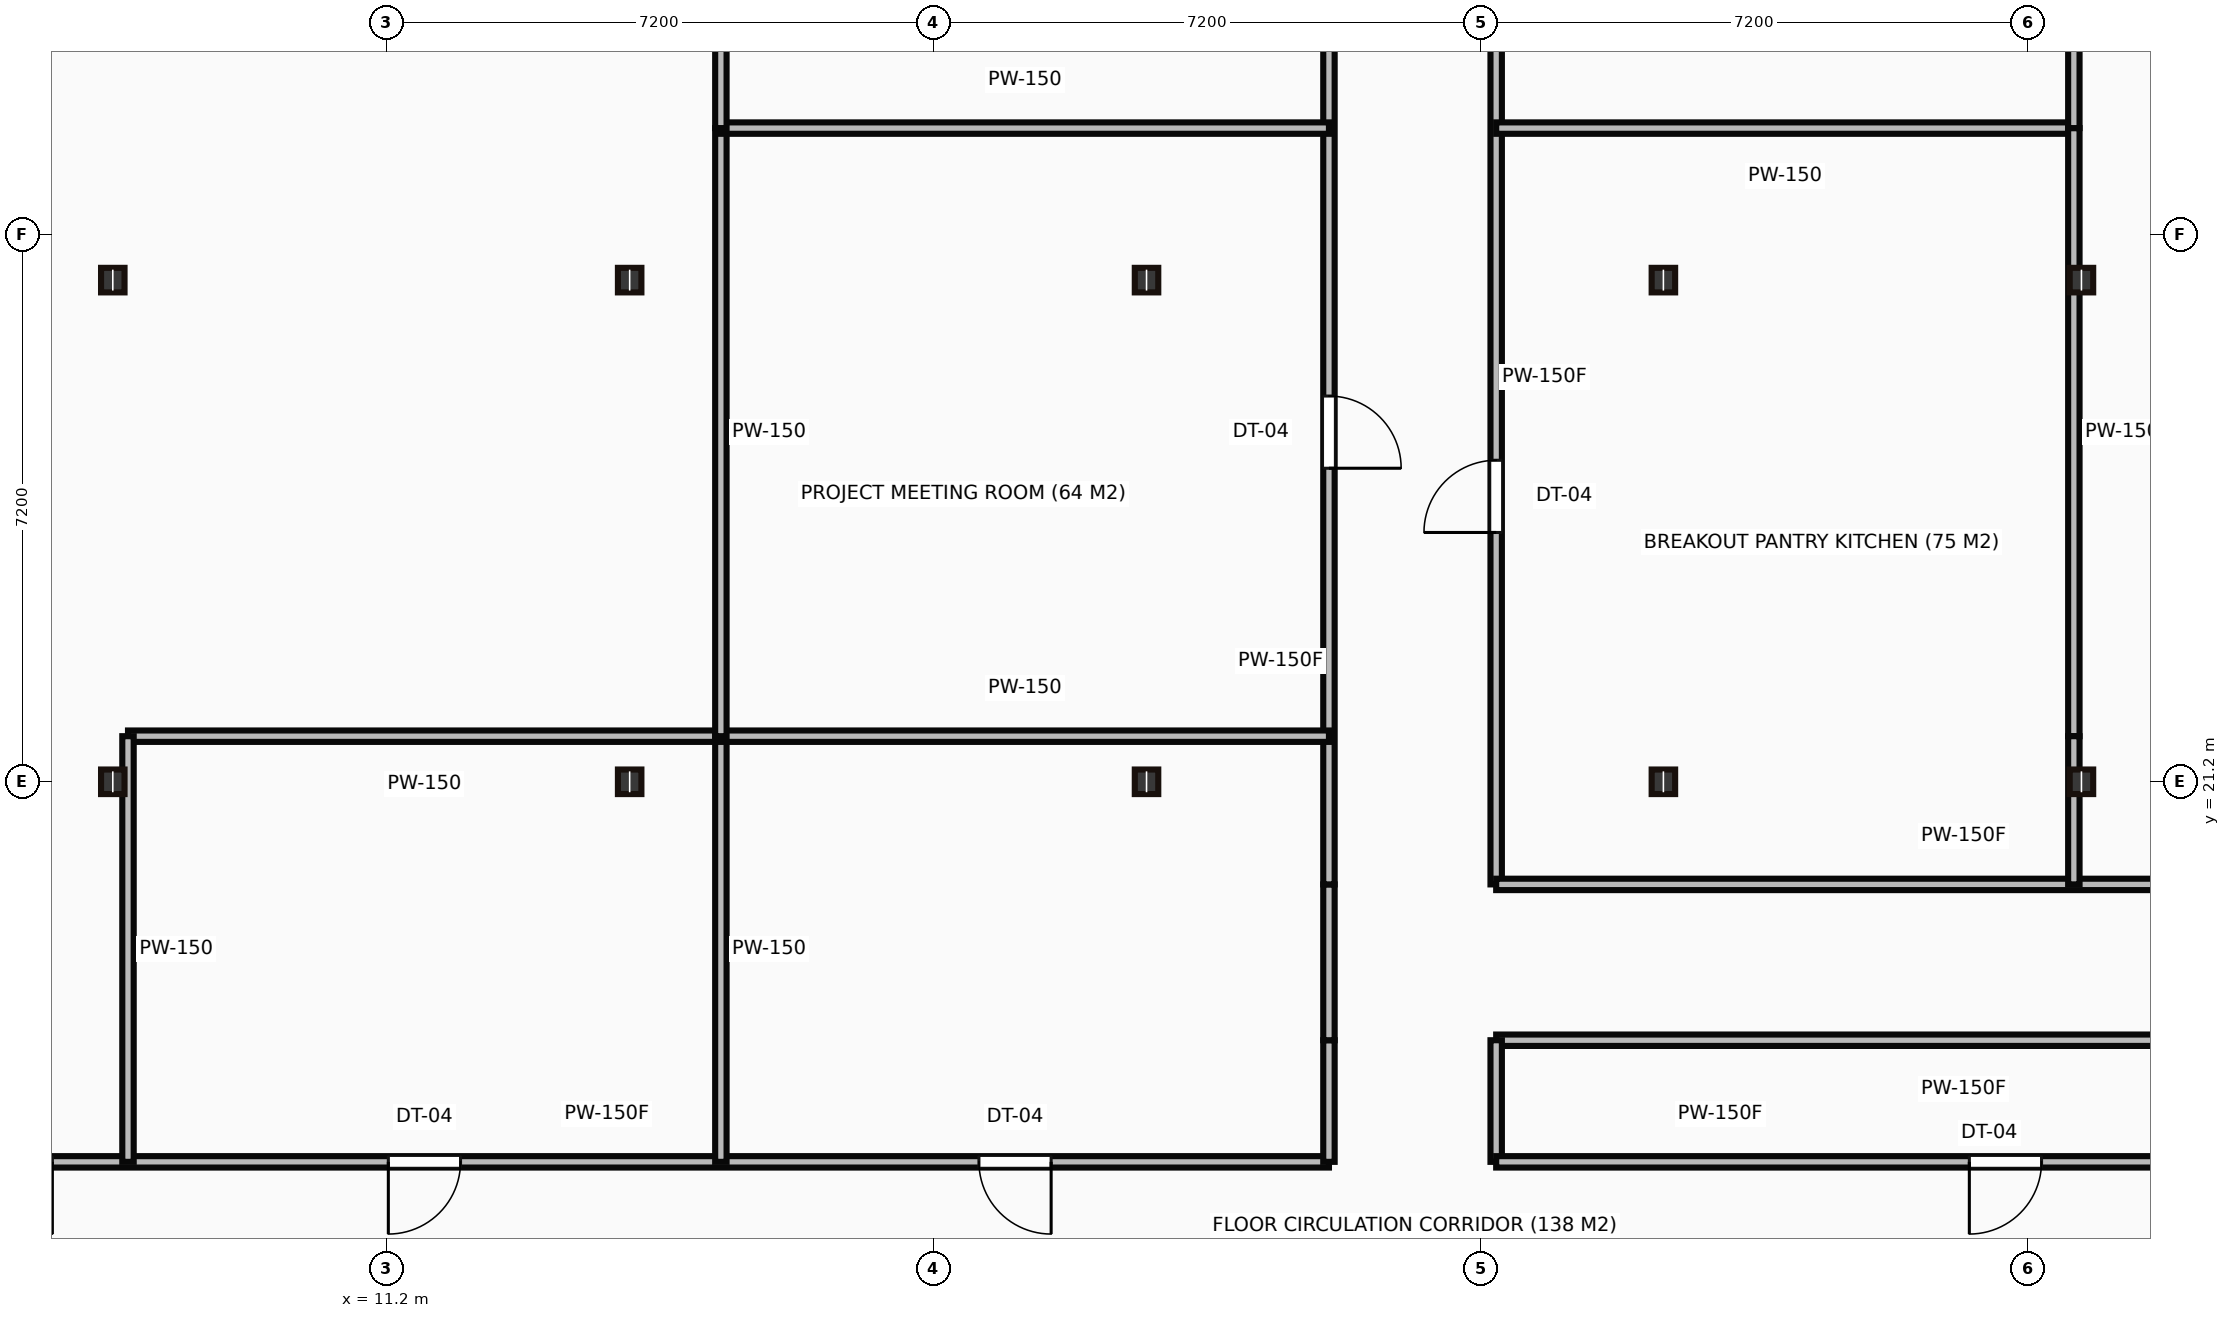
"""IFC4 building model, lengths in metres.
Left out: names, types, materials, properties, quantities, classifications, styles, units other than length and angle.
Written with IfcOpenShell. Run it as: python <this file> out.ifc"""

import sys

from ifc_helpers import new_model, si_unit, direction, frame, frame_2d, origin, origin_2d, place, context, subcontext, project, spatial, rectangle, i_section, extrude, source, transform, mapped, element, fill, save


model = new_model("IFC4")
c1 = context("Model", 3, precision=1e-05, world=origin(), true_north=direction((0.0, 1.0)))
c2 = subcontext(c1, "Body", "Model", "MODEL_VIEW")
j1 = project(units=[si_unit("LENGTHUNIT", "METRE"), si_unit("PLANEANGLEUNIT", "RADIAN")], contexts=[c1])
p1 = place(None, origin())
s1 = spatial("IfcSite", under=j1, at=p1, CompositionType="ELEMENT")
p2 = place(p1, origin())
s2 = spatial("IfcBuilding", under=s1, at=p2, CompositionType="ELEMENT")
p3 = place(p2, frame((0.0, 0.0, 195.9)))
s3 = spatial("IfcBuildingStorey", under=s2, at=p3, CompositionType="ELEMENT", Elevation=195.9)
m1 = source(origin(), c2, "Body", "SweptSolid", [
    extrude(i_section(OverallWidth=0.309, OverallDepth=0.323, WebThickness=0.014, FlangeThickness=0.023, at=origin_2d()), origin(), (0.0, 0.0, 1.0), 3.65),
])
for number, where, z_axis, x_axis in (
    (1, (7.6, 21.2, 0.0), (0.0, 0.0, 1.0), (1.0, 0.0, 0.0)),
    (2, (7.6, 27.8, 0.0), (0.0, 0.0, 1.0), (1.0, 0.0, 0.0)),
    (3, (14.4, 21.2, 0.0), (0.0, 0.0, 1.0), (1.0, 0.0, 0.0)),
    (4, (14.4, 27.8, 0.0), (0.0, 0.0, 1.0), (1.0, 0.0, 0.0)),
    (5, (21.2, 21.2, 0.0), (0.0, 0.0, 1.0), (1.0, 0.0, 0.0)),
    (6, (21.2, 27.8, 0.0), (0.0, 0.0, 1.0), (1.0, 0.0, 0.0)),
    (7, (28.0, 21.2, 0.0), (0.0, 0.0, 1.0), (1.0, 0.0, 0.0)),
    (8, (28.0, 27.8, 0.0), (0.0, 0.0, 1.0), (1.0, 0.0, 0.0)),
    (9, (33.5, 21.2, 0.0), (0.0, 0.0, 1.0), (1.0, 0.0, 0.0)),
    (10, (33.5, 27.8, 0.0), (0.0, 0.0, 1.0), (1.0, 0.0, 0.0)),
):
    element("IfcColumn", number, at=place(p3, frame(where, z_axis=z_axis, x_axis=x_axis)), inside=s3, PredefinedType="COLUMN", context=c2, shape_type="MappedRepresentation", body=[
        mapped(m1, transform((0.0, 0.0, 0.0))),
    ])
m2 = source(origin(), c2, "Body", "SweptSolid", [
    extrude(rectangle(XDim=19.0, YDim=0.15, at=frame_2d((9.5, 0.0))), origin(), (0.0, 0.0, 1.0), 3.4),
])
p4 = place(p3, frame((4.6, 16.2, 0.0), z_axis=(0.0, 0.0, 1.0), x_axis=(1.0, 0.0, 0.0)))
e11 = element("IfcWall", 11, at=p4, inside=s3, PredefinedType="PARTITIONING", context=c2, shape_type="MappedRepresentation", body=[
    mapped(m2, transform((0.0, 0.0, 0.0))),
])
p5 = place(p4, frame((1.255, 0.0, 0.0)))
e12 = element("IfcOpeningElement", 12, at=p5, cuts=e11, PredefinedType="OPENING", context=c2, shape_type="SweptSolid", body=[
    extrude(rectangle(XDim=0.95, YDim=2.15, at=frame_2d((0.475, 1.075))), frame((0.0, 0.085, 0.0), z_axis=(0.0, -1.0, 0.0), x_axis=(1.0, 0.0, 0.0)), (0.0, 0.0, 1.0), 0.17),
])
p6 = place(p4, frame((6.625, 0.0, 0.0)))
e13 = element("IfcOpeningElement", 13, at=p6, cuts=e11, PredefinedType="OPENING", context=c2, shape_type="SweptSolid", body=[
    extrude(rectangle(XDim=0.95, YDim=2.15, at=frame_2d((0.475, 1.075))), frame((0.0, 0.085, 0.0), z_axis=(0.0, -1.0, 0.0), x_axis=(1.0, 0.0, 0.0)), (0.0, 0.0, 1.0), 0.17),
])
p7 = place(p4, frame((14.395, 0.0, 0.0)))
e14 = element("IfcOpeningElement", 14, at=p7, cuts=e11, PredefinedType="OPENING", context=c2, shape_type="SweptSolid", body=[
    extrude(rectangle(XDim=0.95, YDim=2.15, at=frame_2d((0.475, 1.075))), frame((0.0, 0.085, 0.0), z_axis=(0.0, -1.0, 0.0), x_axis=(1.0, 0.0, 0.0)), (0.0, 0.0, 1.0), 0.17),
])
m3 = source(origin(), c2, "Body", "SweptSolid", [
    extrude(rectangle(XDim=1.6, YDim=0.15, at=frame_2d((0.8, 0.0))), origin(), (0.0, 0.0, 1.0), 3.4),
])
p8 = place(p3, frame((23.6, 16.2, 0.0), z_axis=(0.0, 0.0, 1.0), x_axis=(0.0, 1.0, 0.0)))
e15 = element("IfcWall", 15, at=p8, inside=s3, PredefinedType="PARTITIONING", context=c2, shape_type="MappedRepresentation", body=[
    mapped(m3, transform((0.0, 0.0, 0.0))),
])
m4 = source(origin(), c2, "Body", "SweptSolid", [
    extrude(rectangle(XDim=2.05, YDim=0.15, at=frame_2d((1.025, 0.0))), origin(), (0.0, 0.0, 1.0), 3.4),
])
p9 = place(p3, frame((23.6, 17.8, 0.0), z_axis=(0.0, 0.0, 1.0), x_axis=(0.0, 1.0, 0.0)))
e16 = element("IfcWall", 16, at=p9, inside=s3, PredefinedType="PARTITIONING", context=c2, shape_type="MappedRepresentation", body=[
    mapped(m4, transform((0.0, 0.0, 0.0))),
])
m5 = source(origin(), c2, "Body", "SweptSolid", [
    extrude(rectangle(XDim=13.35, YDim=0.15, at=frame_2d((6.675, 0.0))), origin(), (0.0, 0.0, 1.0), 3.4),
])
p10 = place(p3, frame((23.6, 19.85, 0.0), z_axis=(0.0, 0.0, 1.0), x_axis=(0.0, 1.0, 0.0)))
e17 = element("IfcWall", 17, at=p10, inside=s3, PredefinedType="PARTITIONING", context=c2, shape_type="MappedRepresentation", body=[
    mapped(m5, transform((0.0, 0.0, 0.0))),
])
p11 = place(p10, frame((5.475, 0.0, 0.0)))
e18 = element("IfcOpeningElement", 18, at=p11, cuts=e17, PredefinedType="OPENING", context=c2, shape_type="SweptSolid", body=[
    extrude(rectangle(XDim=0.95, YDim=2.15, at=frame_2d((0.475, 1.075))), frame((0.0, 0.085, 0.0), z_axis=(0.0, -1.0, 0.0), x_axis=(1.0, 0.0, 0.0)), (0.0, 0.0, 1.0), 0.17),
])
p12 = place(p10, frame((11.045, 0.0, 0.0)))
e19 = element("IfcOpeningElement", 19, at=p12, cuts=e17, PredefinedType="OPENING", context=c2, shape_type="SweptSolid", body=[
    extrude(rectangle(XDim=0.95, YDim=2.15, at=frame_2d((0.475, 1.075))), frame((0.0, 0.085, 0.0), z_axis=(0.0, -1.0, 0.0), x_axis=(1.0, 0.0, 0.0)), (0.0, 0.0, 1.0), 0.17),
])
p13 = place(p3, frame((25.8, 33.2, 0.0), z_axis=(0.0, 0.0, 1.0), x_axis=(0.0, -1.0, 0.0)))
e20 = element("IfcWall", 20, at=p13, inside=s3, PredefinedType="PARTITIONING", context=c2, shape_type="MappedRepresentation", body=[
    mapped(m5, transform((0.0, 0.0, 0.0))),
])
p14 = place(p13, frame((1.355, 0.0, 0.0)))
e21 = element("IfcOpeningElement", 21, at=p14, cuts=e20, PredefinedType="OPENING", context=c2, shape_type="SweptSolid", body=[
    extrude(rectangle(XDim=0.95, YDim=2.15, at=frame_2d((0.475, 1.075))), frame((0.0, 0.085, 0.0), z_axis=(0.0, -1.0, 0.0), x_axis=(1.0, 0.0, 0.0)), (0.0, 0.0, 1.0), 0.17),
])
p15 = place(p13, frame((7.77, 0.0, 0.0)))
e22 = element("IfcOpeningElement", 22, at=p15, cuts=e20, PredefinedType="OPENING", context=c2, shape_type="SweptSolid", body=[
    extrude(rectangle(XDim=0.95, YDim=2.15, at=frame_2d((0.475, 1.075))), frame((0.0, 0.085, 0.0), z_axis=(0.0, -1.0, 0.0), x_axis=(1.0, 0.0, 0.0)), (0.0, 0.0, 1.0), 0.17),
])
m6 = source(origin(), c2, "Body", "SweptSolid", [
    extrude(rectangle(XDim=12.3, YDim=0.15, at=frame_2d((6.15, 0.0))), origin(), (0.0, 0.0, 1.0), 3.4),
])
for number, where, z_axis, x_axis in (
    (23, (25.8, 19.85, 0.0), (0.0, 0.0, 1.0), (1.0, 0.0, 0.0)),
    (24, (38.1, 17.8, 0.0), (0.0, 0.0, 1.0), (-1.0, 0.0, 0.0)),
):
    element("IfcWall", number, at=place(p3, frame(where, z_axis=z_axis, x_axis=x_axis)), inside=s3, PredefinedType="PARTITIONING", context=c2, shape_type="MappedRepresentation", body=[
        mapped(m6, transform((0.0, 0.0, 0.0))),
    ])
p16 = place(p3, frame((25.8, 17.8, 0.0), z_axis=(0.0, 0.0, 1.0), x_axis=(0.0, -1.0, 0.0)))
e25 = element("IfcWall", 25, at=p16, inside=s3, PredefinedType="PARTITIONING", context=c2, shape_type="MappedRepresentation", body=[
    mapped(m3, transform((0.0, 0.0, 0.0))),
])
m7 = source(origin(), c2, "Body", "SweptSolid", [
    extrude(rectangle(XDim=13.4, YDim=0.15, at=frame_2d((6.7, 0.0))), origin(), (0.0, 0.0, 1.0), 3.4),
])
p17 = place(p3, frame((25.8, 16.2, 0.0), z_axis=(0.0, 0.0, 1.0), x_axis=(1.0, 0.0, 0.0)))
e26 = element("IfcWall", 26, at=p17, inside=s3, PredefinedType="PARTITIONING", context=c2, shape_type="MappedRepresentation", body=[
    mapped(m7, transform((0.0, 0.0, 0.0))),
])
p18 = place(p17, frame((6.225, 0.0, 0.0)))
e27 = element("IfcOpeningElement", 27, at=p18, cuts=e26, PredefinedType="OPENING", context=c2, shape_type="SweptSolid", body=[
    extrude(rectangle(XDim=0.95, YDim=2.15, at=frame_2d((0.475, 1.075))), frame((0.0, 0.085, 0.0), z_axis=(0.0, -1.0, 0.0), x_axis=(1.0, 0.0, 0.0)), (0.0, 0.0, 1.0), 0.17),
])
m8 = source(origin(), c2, "Body", "SweptSolid", [
    extrude(rectangle(XDim=7.8, YDim=0.15, at=frame_2d((3.9, 0.0))), origin(), (0.0, 0.0, 1.0), 3.4),
])
p19 = place(p3, frame((15.6, 21.8, 0.0), z_axis=(0.0, 0.0, 1.0), x_axis=(-1.0, 0.0, 0.0)))
e28 = element("IfcWall", 28, at=p19, inside=s3, PredefinedType="PARTITIONING", context=c2, shape_type="MappedRepresentation", body=[
    mapped(m8, transform((0.0, 0.0, 0.0))),
])
m9 = source(origin(), c2, "Body", "SweptSolid", [
    extrude(rectangle(XDim=5.6, YDim=0.15, at=frame_2d((2.8, 0.0))), origin(), (0.0, 0.0, 1.0), 3.4),
])
for number, where, z_axis, x_axis in (
    (29, (7.8, 21.8, 0.0), (0.0, 0.0, 1.0), (0.0, -1.0, 0.0)),
    (30, (15.6, 21.8, 0.0), (0.0, 0.0, 1.0), (0.0, -1.0, 0.0)),
):
    element("IfcWall", number, at=place(p3, frame(where, z_axis=z_axis, x_axis=x_axis)), inside=s3, PredefinedType="PARTITIONING", context=c2, shape_type="MappedRepresentation", body=[
        mapped(m9, transform((0.0, 0.0, 0.0))),
    ])
m10 = source(origin(), c2, "Body", "SweptSolid", [
    extrude(rectangle(XDim=8.0, YDim=0.15, at=frame_2d((4.0, 0.0))), origin(), (0.0, 0.0, 1.0), 3.4),
])
for number, where, z_axis, x_axis in (
    (31, (15.6, 21.8, 0.0), (0.0, 0.0, 1.0), (1.0, 0.0, 0.0)),
    (32, (15.6, 29.8, 0.0), (0.0, 0.0, 1.0), (0.0, -1.0, 0.0)),
    (33, (15.6, 29.8, 0.0), (0.0, 0.0, 1.0), (1.0, 0.0, 0.0)),
):
    element("IfcWall", number, at=place(p3, frame(where, z_axis=z_axis, x_axis=x_axis)), inside=s3, PredefinedType="PARTITIONING", context=c2, shape_type="MappedRepresentation", body=[
        mapped(m10, transform((0.0, 0.0, 0.0))),
    ])
m11 = source(origin(), c2, "Body", "SweptSolid", [
    extrude(rectangle(XDim=9.191, YDim=0.15, at=frame_2d((4.596, 0.0))), origin(), (0.0, 0.0, 1.0), 3.4),
])
p20 = place(p3, frame((15.6, 38.991, 0.0), z_axis=(0.0, 0.0, 1.0), x_axis=(0.0, -1.0, 0.0)))
e34 = element("IfcWall", 34, at=p20, inside=s3, PredefinedType="PARTITIONING", context=c2, shape_type="MappedRepresentation", body=[
    mapped(m11, transform((0.0, 0.0, 0.0))),
])
m12 = source(origin(), c2, "Body", "SweptSolid", [
    extrude(rectangle(XDim=7.6, YDim=0.15, at=frame_2d((3.8, 0.0))), origin(), (0.0, 0.0, 1.0), 3.4),
])
p21 = place(p3, frame((33.4, 29.8, 0.0), z_axis=(0.0, 0.0, 1.0), x_axis=(-1.0, 0.0, 0.0)))
e35 = element("IfcWall", 35, at=p21, inside=s3, PredefinedType="PARTITIONING", context=c2, shape_type="MappedRepresentation", body=[
    mapped(m12, transform((0.0, 0.0, 0.0))),
])
m13 = source(origin(), c2, "Body", "SweptSolid", [
    extrude(rectangle(XDim=8.0, YDim=0.15, at=frame_2d((4.0, 0.0))), origin(), (0.0, 0.0, 1.0), 2.787),
])
p22 = place(p3, frame((33.4, 29.8, 0.0), z_axis=(0.0, 0.0, 1.0), x_axis=(0.0, -1.0, 0.0)))
e36 = element("IfcWall", 36, at=p22, inside=s3, PredefinedType="PARTITIONING", context=c2, shape_type="MappedRepresentation", body=[
    mapped(m13, transform((0.0, 0.0, 0.0))),
])
m14 = source(origin(), c2, "Body", "SweptSolid", [
    extrude(rectangle(XDim=1.95, YDim=0.15, at=frame_2d((0.975, 0.0))), origin(), (0.0, 0.0, 1.0), 2.787),
])
p23 = place(p3, frame((33.4, 21.8, 0.0), z_axis=(0.0, 0.0, 1.0), x_axis=(0.0, -1.0, 0.0)))
e37 = element("IfcWall", 37, at=p23, inside=s3, PredefinedType="PARTITIONING", context=c2, shape_type="MappedRepresentation", body=[
    mapped(m14, transform((0.0, 0.0, 0.0))),
])
m15 = source(origin(), c2, "Body", "SweptSolid", [
    extrude(rectangle(XDim=6.226, YDim=0.15, at=frame_2d((3.113, 0.0))), origin(), (0.0, 0.0, 1.0), 2.787),
])
p24 = place(p3, frame((33.4, 36.026, 0.0), z_axis=(0.0, 0.0, 1.0), x_axis=(0.0, -1.0, 0.0)))
e38 = element("IfcWall", 38, at=p24, inside=s3, PredefinedType="PARTITIONING", context=c2, shape_type="MappedRepresentation", body=[
    mapped(m15, transform((0.0, 0.0, 0.0))),
])
m16 = source(origin(), c2, "Body", "SweptSolid", [
    extrude(rectangle(XDim=0.95, YDim=2.15, at=frame_2d((0.475, 1.075))), frame((0.0, 0.025, 0.0), z_axis=(0.0, -1.0, 0.0), x_axis=(1.0, 0.0, 0.0)), (0.0, 0.0, 1.0), 0.05),
])
p25 = place(p5, origin())
e39 = element("IfcDoor", 39, at=p25, inside=s3, OperationType="SINGLE_SWING_RIGHT", PredefinedType="DOOR", context=c2, shape_type="MappedRepresentation", body=[
    mapped(m16, transform((0.0, 0.0, 0.0))),
])
fill(e12, e39)
p26 = place(p6, origin())
e40 = element("IfcDoor", 40, at=p26, inside=s3, OperationType="SINGLE_SWING_LEFT", PredefinedType="DOOR", context=c2, shape_type="MappedRepresentation", body=[
    mapped(m16, transform((0.0, 0.0, 0.0))),
])
fill(e13, e40)
p27 = place(p7, origin())
e41 = element("IfcDoor", 41, at=p27, inside=s3, OperationType="SINGLE_SWING_RIGHT", PredefinedType="DOOR", context=c2, shape_type="MappedRepresentation", body=[
    mapped(m16, transform((0.0, 0.0, 0.0))),
])
fill(e14, e41)
p28 = place(p11, origin())
e42 = element("IfcDoor", 42, at=p28, inside=s3, OperationType="SINGLE_SWING_LEFT", PredefinedType="DOOR", context=c2, shape_type="MappedRepresentation", body=[
    mapped(m16, transform((0.0, 0.0, 0.0))),
])
fill(e18, e42)
p29 = place(p15, origin())
e43 = element("IfcDoor", 43, at=p29, inside=s3, OperationType="SINGLE_SWING_RIGHT", PredefinedType="DOOR", context=c2, shape_type="MappedRepresentation", body=[
    mapped(m16, transform((0.0, 0.0, 0.0))),
])
fill(e22, e43)
p30 = place(p18, origin())
e44 = element("IfcDoor", 44, at=p30, inside=s3, OperationType="SINGLE_SWING_LEFT", PredefinedType="DOOR", context=c2, shape_type="MappedRepresentation", body=[
    mapped(m16, transform((0.0, 0.0, 0.0))),
])
fill(e27, e44)
save(model, sys.argv[1])
